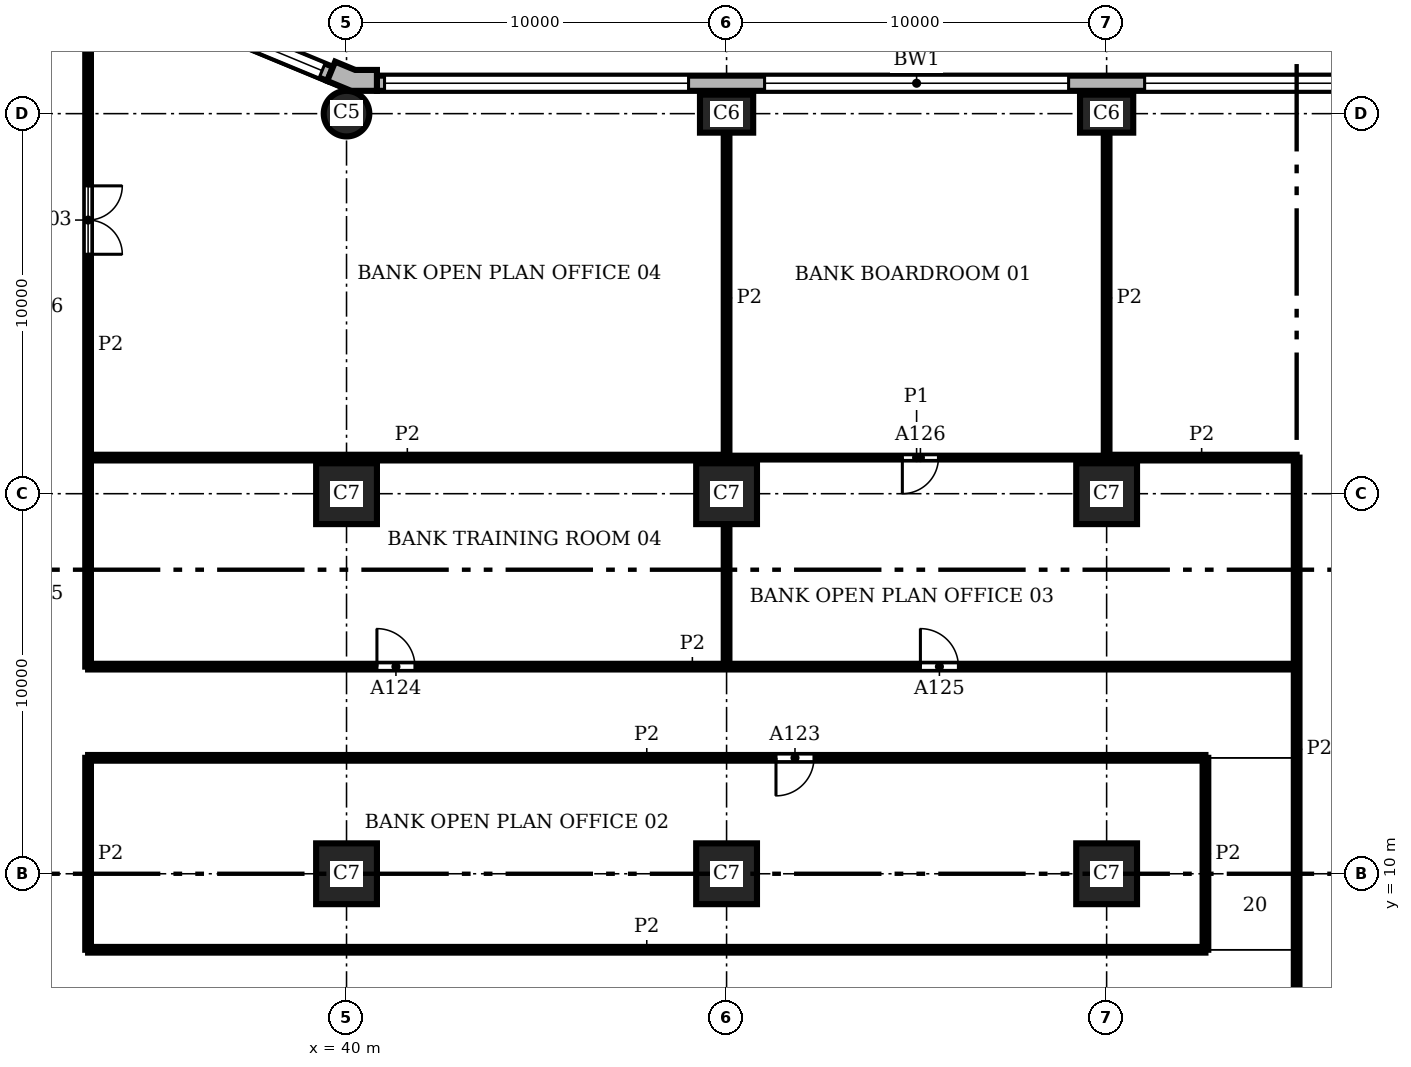
"""IFC4 building model, lengths in metres.
Left out: names, types, materials, properties, quantities, classifications, styles, units other than length and angle.
Written with IfcOpenShell. Run it as: python <this file> out.ifc"""

import sys

from ifc_helpers import new_model, si_unit, direction, frame, frame_2d, origin, origin_2d, place, context, subcontext, project, spatial, polyline, rectangle, circle, outline, extrude, element, fill, save


model = new_model("IFC4")
c1 = context("Model", 3, precision=1e-05, world=origin(), true_north=direction((0.0, 1.0)))
c2 = subcontext(c1, "Body", "Model", "MODEL_VIEW")
j1 = project(units=[si_unit("LENGTHUNIT", "METRE"), si_unit("PLANEANGLEUNIT", "RADIAN")], contexts=[c1])
p1 = place(None, origin())
s1 = spatial("IfcSite", under=j1, at=p1, CompositionType="ELEMENT")
p2 = place(p1, origin())
s2 = spatial("IfcBuilding", under=s1, at=p2, CompositionType="ELEMENT")
p3 = place(p2, frame((0.0, 0.0, 12.0)))
s3 = spatial("IfcBuildingStorey", under=s2, at=p3, CompositionType="ELEMENT", Elevation=12.0)
for number, where, z_axis, x_axis in (
    (1, (60.0, 30.0, 0.0), (0.0, 0.0, 1.0), (1.0, 0.0, 0.0)),
    (2, (50.0, 30.0, 0.0), (0.0, 0.0, 1.0), (1.0, 0.0, 0.0)),
):
    element("IfcColumn", number, at=place(p3, frame(where, z_axis=z_axis, x_axis=x_axis)), inside=s3, PredefinedType="COLUMN", context=c2, shape_type="SweptSolid", body=[
        extrude(rectangle(XDim=1.4, YDim=1.0, at=origin_2d()), origin(), (0.0, 0.0, 1.0), 3.9),
    ])
p4 = place(p3, frame((40.0, 30.0, 0.0), z_axis=(0.0, 0.0, 1.0), x_axis=(1.0, 0.0, 0.0)))
e3 = element("IfcColumn", 3, at=p4, inside=s3, PredefinedType="COLUMN", context=c2, shape_type="SweptSolid", body=[
    extrude(circle(Radius=0.6, at=origin_2d()), origin(), (0.0, 0.0, 1.0), 3.9),
])
for number, where, z_axis, x_axis in (
    (4, (40.0, 10.0, 0.0), (0.0, 0.0, 1.0), (1.0, 0.0, 0.0)),
    (5, (40.0, 20.0, 0.0), (0.0, 0.0, 1.0), (1.0, 0.0, 0.0)),
    (6, (50.0, 10.0, 0.0), (0.0, 0.0, 1.0), (1.0, 0.0, 0.0)),
    (7, (50.0, 20.0, 0.0), (0.0, 0.0, 1.0), (1.0, 0.0, 0.0)),
    (8, (60.0, 10.0, 0.0), (0.0, 0.0, 1.0), (1.0, 0.0, 0.0)),
    (9, (60.0, 20.0, 0.0), (0.0, 0.0, 1.0), (1.0, 0.0, 0.0)),
):
    element("IfcColumn", number, at=place(p3, frame(where, z_axis=z_axis, x_axis=x_axis)), inside=s3, PredefinedType="COLUMN", context=c2, shape_type="SweptSolid", body=[
        extrude(rectangle(XDim=1.6, YDim=1.6, at=origin_2d()), origin(), (0.0, 0.0, 1.0), 3.9),
    ])
p5 = place(p3, origin())
e10 = element("IfcWall", 10, at=p5, inside=s3, PredefinedType="SOLIDWALL", context=c2, shape_type="SweptSolid", body=[
    extrude(outline(polyline([(40.8, 31.0), (40.8, 31.15), (40.229, 31.15), (39.701, 31.369), (39.644, 31.23), (39.49, 30.861), (40.119, 30.6), (40.8, 30.6), (40.8, 31.0)])), origin(), (0.0, 0.0, 1.0), 3.9),
])
p6 = place(p3, frame((69.2, 30.8, 0.0), z_axis=(0.0, 0.0, 1.0), x_axis=(-1.0, 0.0, 0.0)))
e11 = element("IfcWall", 11, at=p6, inside=s3, PredefinedType="SOLIDWALL", context=c2, shape_type="SweptSolid", body=[
    extrude(rectangle(XDim=28.4, YDim=0.4, at=frame_2d((14.2, 0.0))), origin(), (0.0, 0.0, 1.0), 3.9),
])
p7 = place(p6, frame((0.2, 0.0, 0.9)))
e12 = element("IfcOpeningElement", 12, at=p7, cuts=e11, PredefinedType="OPENING", context=c2, shape_type="SweptSolid", body=[
    extrude(rectangle(XDim=8.0, YDim=2.35, at=frame_2d((4.0, 1.175))), frame((0.0, 0.21, 0.0), z_axis=(0.0, -1.0, 0.0), x_axis=(1.0, 0.0, 0.0)), (0.0, 0.0, 1.0), 0.42),
])
p8 = place(p6, frame((10.2, 0.0, 0.9)))
e13 = element("IfcOpeningElement", 13, at=p8, cuts=e11, PredefinedType="OPENING", context=c2, shape_type="SweptSolid", body=[
    extrude(rectangle(XDim=8.0, YDim=2.35, at=frame_2d((4.0, 1.175))), frame((0.0, 0.21, 0.0), z_axis=(0.0, -1.0, 0.0), x_axis=(1.0, 0.0, 0.0)), (0.0, 0.0, 1.0), 0.42),
])
p9 = place(p6, frame((20.2, 0.0, 0.9)))
e14 = element("IfcOpeningElement", 14, at=p9, cuts=e11, PredefinedType="OPENING", context=c2, shape_type="SweptSolid", body=[
    extrude(rectangle(XDim=8.0, YDim=2.35, at=frame_2d((4.0, 1.175))), frame((0.0, 0.21, 0.0), z_axis=(0.0, -1.0, 0.0), x_axis=(1.0, 0.0, 0.0)), (0.0, 0.0, 1.0), 0.42),
])
p10 = place(p3, frame((39.567, 31.045, 0.0), z_axis=(0.0, 0.0, 1.0), x_axis=(-0.923891000409, 0.382655745237, 0.0)))
e15 = element("IfcWall", 15, at=p10, inside=s3, PredefinedType="SOLIDWALL", context=c2, shape_type="SweptSolid", body=[
    extrude(rectangle(XDim=6.053, YDim=0.4, at=frame_2d((3.027, 0.0))), origin(), (0.0, 0.0, 1.0), 3.9),
])
p11 = place(p10, frame((0.227, 0.0, 0.9)))
e16 = element("IfcOpeningElement", 16, at=p11, cuts=e15, PredefinedType="OPENING", context=c2, shape_type="SweptSolid", body=[
    extrude(rectangle(XDim=5.6, YDim=2.35, at=frame_2d((2.8, 1.175))), frame((0.0, 0.21, 0.0), z_axis=(0.0, -1.0, 0.0), x_axis=(1.0, 0.0, 0.0)), (0.0, 0.0, 1.0), 0.42),
])
p12 = place(p3, frame((50.0, 20.95, 0.0), z_axis=(0.0, 0.0, 1.0), x_axis=(1.0, 0.0, 0.0)))
e17 = element("IfcWall", 17, at=p12, inside=s3, PredefinedType="PARTITIONING", context=c2, shape_type="SweptSolid", body=[
    extrude(rectangle(XDim=10.0, YDim=0.1, at=frame_2d((5.0, 0.0))), origin(), (0.0, 0.0, 1.0), 3.58),
])
p13 = place(p12, frame((4.625, 0.0, 0.0)))
e18 = element("IfcOpeningElement", 18, at=p13, cuts=e17, PredefinedType="OPENING", context=c2, shape_type="SweptSolid", body=[
    extrude(rectangle(XDim=0.95, YDim=2.1, at=frame_2d((0.475, 1.05))), frame((0.0, 0.06, 0.0), z_axis=(0.0, -1.0, 0.0), x_axis=(1.0, 0.0, 0.0)), (0.0, 0.0, 1.0), 0.12),
])
p14 = place(p3, frame((33.2, 8.0, 0.0), z_axis=(0.0, 0.0, 1.0), x_axis=(0.0, 1.0, 0.0)))
e19 = element("IfcWall", 19, at=p14, inside=s3, PredefinedType="PARTITIONING", context=c2, shape_type="SweptSolid", body=[
    extrude(rectangle(XDim=5.05, YDim=0.15, at=frame_2d((2.525, 0.0))), origin(), (0.0, 0.0, 1.0), 3.58),
])
p15 = place(p3, frame((33.2, 15.45, 0.0), z_axis=(0.0, 0.0, 1.0), x_axis=(0.0, 1.0, 0.0)))
e20 = element("IfcWall", 20, at=p15, inside=s3, PredefinedType="PARTITIONING", context=c2, shape_type="SweptSolid", body=[
    extrude(rectangle(XDim=16.912, YDim=0.15, at=frame_2d((8.456, 0.0))), origin(), (0.0, 0.0, 1.0), 3.58),
])
p16 = place(p15, frame((10.85, 0.0, 0.0)))
e21 = element("IfcOpeningElement", 21, at=p16, cuts=e20, PredefinedType="OPENING", context=c2, shape_type="SweptSolid", body=[
    extrude(rectangle(XDim=1.8, YDim=2.1, at=frame_2d((0.9, 1.05))), frame((0.0, 0.085, 0.0), z_axis=(0.0, -1.0, 0.0), x_axis=(1.0, 0.0, 0.0)), (0.0, 0.0, 1.0), 0.17),
])
p17 = place(p3, frame((50.0, 15.45, 0.0), z_axis=(0.0, 0.0, 1.0), x_axis=(0.0, 1.0, 0.0)))
e22 = element("IfcWall", 22, at=p17, inside=s3, PredefinedType="PARTITIONING", context=c2, shape_type="SweptSolid", body=[
    extrude(rectangle(XDim=3.75, YDim=0.15, at=frame_2d((1.875, 0.0))), origin(), (0.0, 0.0, 1.0), 3.58),
])
for number, where, z_axis, x_axis in (
    (23, (50.0, 20.8, 0.0), (0.0, 0.0, 1.0), (0.0, 1.0, 0.0)),
    (24, (60.0, 20.8, 0.0), (0.0, 0.0, 1.0), (0.0, 1.0, 0.0)),
):
    element("IfcWall", number, at=place(p3, frame(where, z_axis=z_axis, x_axis=x_axis)), inside=s3, PredefinedType="PARTITIONING", context=c2, shape_type="SweptSolid", body=[
        extrude(rectangle(XDim=8.7, YDim=0.15, at=frame_2d((4.35, 0.0))), origin(), (0.0, 0.0, 1.0), 3.58),
    ])
p18 = place(p3, frame((62.6, 8.0, 0.0), z_axis=(0.0, 0.0, 1.0), x_axis=(0.0, 1.0, 0.0)))
e25 = element("IfcWall", 25, at=p18, inside=s3, PredefinedType="PARTITIONING", context=c2, shape_type="SweptSolid", body=[
    extrude(rectangle(XDim=5.05, YDim=0.15, at=frame_2d((2.525, 0.0))), origin(), (0.0, 0.0, 1.0), 3.58),
])
p19 = place(p3, frame((65.0, 5.6, 0.0), z_axis=(0.0, 0.0, 1.0), x_axis=(0.0, 1.0, 0.0)))
e26 = element("IfcWall", 26, at=p19, inside=s3, PredefinedType="PARTITIONING", context=c2, shape_type="SweptSolid", body=[
    extrude(rectangle(XDim=15.35, YDim=0.15, at=frame_2d((7.675, 0.0))), origin(), (0.0, 0.0, 1.0), 3.58),
])
p20 = place(p3, frame((33.2, 8.0, 0.0), z_axis=(0.0, 0.0, 1.0), x_axis=(1.0, 0.0, 0.0)))
e27 = element("IfcWall", 27, at=p20, inside=s3, PredefinedType="PARTITIONING", context=c2, shape_type="SweptSolid", body=[
    extrude(rectangle(XDim=29.4, YDim=0.15, at=frame_2d((14.7, 0.0))), origin(), (0.0, 0.0, 1.0), 3.58),
])
p21 = place(p3, frame((33.2, 13.05, 0.0), z_axis=(0.0, 0.0, 1.0), x_axis=(1.0, 0.0, 0.0)))
e28 = element("IfcWall", 28, at=p21, inside=s3, PredefinedType="PARTITIONING", context=c2, shape_type="SweptSolid", body=[
    extrude(rectangle(XDim=29.4, YDim=0.15, at=frame_2d((14.7, 0.0))), origin(), (0.0, 0.0, 1.0), 3.58),
])
p22 = place(p21, frame((18.1, 0.0, 0.0)))
e29 = element("IfcOpeningElement", 29, at=p22, cuts=e28, PredefinedType="OPENING", context=c2, shape_type="SweptSolid", body=[
    extrude(rectangle(XDim=1.0, YDim=2.1, at=frame_2d((0.5, 1.05))), frame((0.0, 0.085, 0.0), z_axis=(0.0, -1.0, 0.0), x_axis=(1.0, 0.0, 0.0)), (0.0, 0.0, 1.0), 0.17),
])
p23 = place(p3, frame((33.2, 15.45, 0.0), z_axis=(0.0, 0.0, 1.0), x_axis=(1.0, 0.0, 0.0)))
e30 = element("IfcWall", 30, at=p23, inside=s3, PredefinedType="PARTITIONING", context=c2, shape_type="SweptSolid", body=[
    extrude(rectangle(XDim=31.8, YDim=0.15, at=frame_2d((15.9, 0.0))), origin(), (0.0, 0.0, 1.0), 3.58),
])
p24 = place(p23, frame((7.6, 0.0, 0.0)))
e31 = element("IfcOpeningElement", 31, at=p24, cuts=e30, PredefinedType="OPENING", context=c2, shape_type="SweptSolid", body=[
    extrude(rectangle(XDim=1.0, YDim=2.1, at=frame_2d((0.5, 1.05))), frame((0.0, 0.085, 0.0), z_axis=(0.0, -1.0, 0.0), x_axis=(1.0, 0.0, 0.0)), (0.0, 0.0, 1.0), 0.17),
])
p25 = place(p23, frame((21.9, 0.0, 0.0)))
e32 = element("IfcOpeningElement", 32, at=p25, cuts=e30, PredefinedType="OPENING", context=c2, shape_type="SweptSolid", body=[
    extrude(rectangle(XDim=1.0, YDim=2.1, at=frame_2d((0.5, 1.05))), frame((0.0, 0.085, 0.0), z_axis=(0.0, -1.0, 0.0), x_axis=(1.0, 0.0, 0.0)), (0.0, 0.0, 1.0), 0.17),
])
p26 = place(p3, frame((33.2, 20.95, 0.0), z_axis=(0.0, 0.0, 1.0), x_axis=(1.0, 0.0, 0.0)))
e33 = element("IfcWall", 33, at=p26, inside=s3, PredefinedType="PARTITIONING", context=c2, shape_type="SweptSolid", body=[
    extrude(rectangle(XDim=16.8, YDim=0.15, at=frame_2d((8.4, 0.0))), origin(), (0.0, 0.0, 1.0), 3.58),
])
p27 = place(p3, frame((60.0, 20.95, 0.0), z_axis=(0.0, 0.0, 1.0), x_axis=(1.0, 0.0, 0.0)))
e34 = element("IfcWall", 34, at=p27, inside=s3, PredefinedType="PARTITIONING", context=c2, shape_type="SweptSolid", body=[
    extrude(rectangle(XDim=5.0, YDim=0.15, at=frame_2d((2.5, 0.0))), origin(), (0.0, 0.0, 1.0), 3.58),
])
p28 = place(p7, origin())
e35 = element("IfcWindow", 35, at=p28, inside=s3, PartitioningType="SINGLE_PANEL", PredefinedType="WINDOW", context=c2, shape_type="SweptSolid", body=[
    extrude(rectangle(XDim=8.0, YDim=2.35, at=frame_2d((4.0, 1.175))), frame((0.0, 0.16, 0.0), z_axis=(0.0, -1.0, 0.0), x_axis=(1.0, 0.0, 0.0)), (0.0, 0.0, 1.0), 0.06),
])
fill(e12, e35)
p29 = place(p8, origin())
e36 = element("IfcWindow", 36, at=p29, inside=s3, PartitioningType="SINGLE_PANEL", PredefinedType="WINDOW", context=c2, shape_type="SweptSolid", body=[
    extrude(rectangle(XDim=8.0, YDim=2.35, at=frame_2d((4.0, 1.175))), frame((0.0, 0.16, 0.0), z_axis=(0.0, -1.0, 0.0), x_axis=(1.0, 0.0, 0.0)), (0.0, 0.0, 1.0), 0.06),
])
fill(e13, e36)
p30 = place(p9, origin())
e37 = element("IfcWindow", 37, at=p30, inside=s3, PartitioningType="SINGLE_PANEL", PredefinedType="WINDOW", context=c2, shape_type="SweptSolid", body=[
    extrude(rectangle(XDim=8.0, YDim=2.35, at=frame_2d((4.0, 1.175))), frame((0.0, 0.16, 0.0), z_axis=(0.0, -1.0, 0.0), x_axis=(1.0, 0.0, 0.0)), (0.0, 0.0, 1.0), 0.06),
])
fill(e14, e37)
p31 = place(p11, origin())
e38 = element("IfcWindow", 38, at=p31, inside=s3, PartitioningType="SINGLE_PANEL", PredefinedType="WINDOW", context=c2, shape_type="SweptSolid", body=[
    extrude(rectangle(XDim=5.6, YDim=2.35, at=frame_2d((2.8, 1.175))), frame((0.0, 0.16, 0.0), z_axis=(0.0, -1.0, 0.0), x_axis=(1.0, 0.0, 0.0)), (0.0, 0.0, 1.0), 0.06),
])
fill(e16, e38)
p32 = place(p16, frame((1.8, 0.0, 0.0), z_axis=(0.0, 0.0, 1.0), x_axis=(-1.0, 0.0, 0.0)))
e39 = element("IfcDoor", 39, at=p32, inside=s3, OperationType="DOUBLE_DOOR_SINGLE_SWING", PredefinedType="DOOR", context=c2, shape_type="SweptSolid", body=[
    extrude(rectangle(XDim=1.8, YDim=2.1, at=frame_2d((0.9, 1.05))), frame((0.0, 0.025, 0.0), z_axis=(0.0, -1.0, 0.0), x_axis=(1.0, 0.0, 0.0)), (0.0, 0.0, 1.0), 0.05),
])
fill(e21, e39)
p33 = place(p22, frame((1.0, 0.0, 0.0), z_axis=(0.0, 0.0, 1.0), x_axis=(-1.0, 0.0, 0.0)))
e40 = element("IfcDoor", 40, at=p33, inside=s3, OperationType="SINGLE_SWING_RIGHT", PredefinedType="DOOR", context=c2, shape_type="SweptSolid", body=[
    extrude(rectangle(XDim=1.0, YDim=2.1, at=frame_2d((0.5, 1.05))), frame((0.0, 0.025, 0.0), z_axis=(0.0, -1.0, 0.0), x_axis=(1.0, 0.0, 0.0)), (0.0, 0.0, 1.0), 0.05),
])
fill(e29, e40)
p34 = place(p24, origin())
e41 = element("IfcDoor", 41, at=p34, inside=s3, OperationType="SINGLE_SWING_LEFT", PredefinedType="DOOR", context=c2, shape_type="SweptSolid", body=[
    extrude(rectangle(XDim=1.0, YDim=2.1, at=frame_2d((0.5, 1.05))), frame((0.0, 0.025, 0.0), z_axis=(0.0, -1.0, 0.0), x_axis=(1.0, 0.0, 0.0)), (0.0, 0.0, 1.0), 0.05),
])
fill(e31, e41)
p35 = place(p25, origin())
e42 = element("IfcDoor", 42, at=p35, inside=s3, OperationType="SINGLE_SWING_LEFT", PredefinedType="DOOR", context=c2, shape_type="SweptSolid", body=[
    extrude(rectangle(XDim=1.0, YDim=2.1, at=frame_2d((0.5, 1.05))), frame((0.0, 0.025, 0.0), z_axis=(0.0, -1.0, 0.0), x_axis=(1.0, 0.0, 0.0)), (0.0, 0.0, 1.0), 0.05),
])
fill(e32, e42)
p36 = place(p13, frame((0.95, 0.0, 0.0), z_axis=(0.0, 0.0, 1.0), x_axis=(-1.0, 0.0, 0.0)))
e43 = element("IfcDoor", 43, at=p36, inside=s3, OperationType="SINGLE_SWING_RIGHT", PredefinedType="DOOR", context=c2, shape_type="SweptSolid", body=[
    extrude(rectangle(XDim=0.95, YDim=2.1, at=frame_2d((0.475, 1.05))), frame((0.0, 0.025, 0.0), z_axis=(0.0, -1.0, 0.0), x_axis=(1.0, 0.0, 0.0)), (0.0, 0.0, 1.0), 0.05),
])
fill(e18, e43)
save(model, sys.argv[1])
